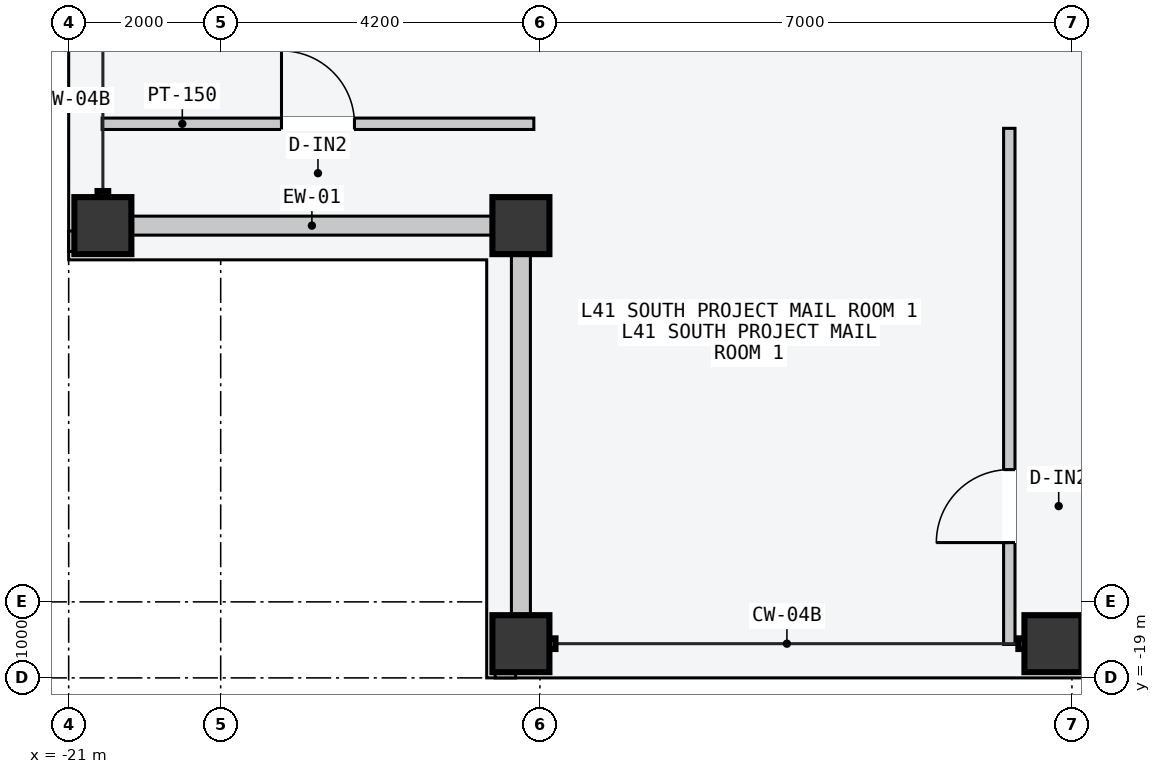
"""IFC4 building model, lengths in metres.
Left out: names, types, materials, properties, quantities, classifications, styles, units other than length and angle.
Written with IfcOpenShell. Run it as: python <this file> out.ifc"""

import sys

from ifc_helpers import new_model, si_unit, direction, frame, frame_2d, origin, origin_2d, place, context, subcontext, project, spatial, rectangle, hollow_rectangle, extrude, element, fill, save


model = new_model("IFC4")
c1 = context("Model", 3, precision=1e-05, world=origin(), true_north=direction((0.0, 1.0)))
c2 = subcontext(c1, "Body", "Model", "MODEL_VIEW")
j1 = project(units=[si_unit("LENGTHUNIT", "METRE"), si_unit("PLANEANGLEUNIT", "RADIAN")], contexts=[c1])
p1 = place(None, origin())
s1 = spatial("IfcSite", under=j1, at=p1, CompositionType="ELEMENT")
p2 = place(p1, origin())
s2 = spatial("IfcBuilding", under=s1, at=p2, CompositionType="ELEMENT")
p3 = place(p2, frame((0.0, 0.0, 158.7)))
s3 = spatial("IfcBuildingStorey", under=s2, at=p3, CompositionType="ELEMENT", Elevation=158.7)
for number, where, z_axis, x_axis in (
    (1, (-15.05, -18.55, 0.0), (0.0, 0.0, 1.0), (1.0, 0.0, 0.0)),
    (2, (-8.05, -18.55, 0.0), (0.0, 0.0, 1.0), (1.0, 0.0, 0.0)),
    (3, (-20.55, -13.05, 0.0), (0.0, 0.0, 1.0), (0.0, 1.0, 0.0)),
    (4, (-15.05, -13.05, 0.0), (0.0, 0.0, 1.0), (1.0, 0.0, 0.0)),
):
    element("IfcColumn", number, at=place(p3, frame(where, z_axis=z_axis, x_axis=x_axis)), inside=s3, PredefinedType="COLUMN", context=c2, shape_type="SweptSolid", body=[
        extrude(hollow_rectangle(XDim=0.75, YDim=0.75, WallThickness=0.032, at=origin_2d()), origin(), (0.0, 0.0, 1.0), 3.6),
    ])
for number, where, z_axis, x_axis in (
    (5, (-20.165, -13.05, 0.0), (0.0, 0.0, 1.0), (1.0, 0.0, 0.0)),
    (6, (-15.05, -18.165, 0.0), (0.0, 0.0, 1.0), (0.0, 1.0, 0.0)),
):
    element("IfcWall", number, at=place(p3, frame(where, z_axis=z_axis, x_axis=x_axis)), inside=s3, PredefinedType="STANDARD", context=c2, shape_type="SweptSolid", body=[
        extrude(rectangle(XDim=4.73, YDim=0.25, at=frame_2d((2.365, 0.0))), origin(), (0.0, 0.0, 1.0), 2.75),
    ])
for number, where, z_axis, x_axis in (
    (7, (-15.39, -18.89, 0.0), (0.0, 0.0, 1.0), (1.0, 0.0, 0.0)),
    (8, (-20.89, -13.39, 0.0), (0.0, 0.0, 1.0), (0.0, 1.0, 0.0)),
):
    element("IfcWall", number, at=place(p3, frame(where, z_axis=z_axis, x_axis=x_axis)), inside=s3, PredefinedType="PARAPET", context=c2, shape_type="SweptSolid", body=[
        extrude(rectangle(XDim=0.27, YDim=0.22, at=frame_2d((0.135, 0.0))), origin(), (0.0, 0.0, 1.0), 1.2),
    ])
p4 = place(p3, frame((-8.624, -18.56, 0.0), z_axis=(0.0, 0.0, 1.0), x_axis=(0.0, 1.0, 0.0)))
e9 = element("IfcWall", 9, at=p4, inside=s3, PredefinedType="PARTITIONING", context=c2, shape_type="SweptSolid", body=[
    extrude(rectangle(XDim=6.79, YDim=0.15, at=frame_2d((3.395, 0.0))), origin(), (0.0, 0.0, 1.0), 3.4),
])
p5 = place(p4, frame((1.34, 0.0, 0.0)))
e10 = element("IfcOpeningElement", 10, at=p5, cuts=e9, PredefinedType="OPENING", context=c2, shape_type="SweptSolid", body=[
    extrude(rectangle(XDim=0.96, YDim=2.18, at=frame_2d((0.48, 1.09))), frame((0.0, 0.085, 0.0), z_axis=(0.0, -1.0, 0.0), x_axis=(1.0, 0.0, 0.0)), (0.0, 0.0, 1.0), 0.17),
])
p6 = place(p3, frame((-20.56, -11.71, 0.0), z_axis=(0.0, 0.0, 1.0), x_axis=(1.0, 0.0, 0.0)))
e11 = element("IfcWall", 11, at=p6, inside=s3, PredefinedType="PARTITIONING", context=c2, shape_type="SweptSolid", body=[
    extrude(rectangle(XDim=5.68, YDim=0.15, at=frame_2d((2.84, 0.0))), origin(), (0.0, 0.0, 1.0), 3.4),
])
p7 = place(p6, frame((2.36, 0.0, 0.0)))
e12 = element("IfcOpeningElement", 12, at=p7, cuts=e11, PredefinedType="OPENING", context=c2, shape_type="SweptSolid", body=[
    extrude(rectangle(XDim=0.96, YDim=2.18, at=frame_2d((0.48, 1.09))), frame((0.0, 0.085, 0.0), z_axis=(0.0, -1.0, 0.0), x_axis=(1.0, 0.0, 0.0)), (0.0, 0.0, 1.0), 0.17),
])
p8 = place(p5, origin())
e13 = element("IfcDoor", 13, at=p8, inside=s3, OperationType="SINGLE_SWING_LEFT", PredefinedType="DOOR", context=c2, shape_type="SweptSolid", body=[
    extrude(rectangle(XDim=0.96, YDim=2.18, at=frame_2d((0.48, 1.09))), frame((0.0, 0.025, 0.0), z_axis=(0.0, -1.0, 0.0), x_axis=(1.0, 0.0, 0.0)), (0.0, 0.0, 1.0), 0.05),
])
fill(e10, e13)
p9 = place(p7, origin())
e14 = element("IfcDoor", 14, at=p9, inside=s3, OperationType="SINGLE_SWING_LEFT", PredefinedType="DOOR", context=c2, shape_type="SweptSolid", body=[
    extrude(rectangle(XDim=0.96, YDim=2.18, at=frame_2d((0.48, 1.09))), frame((0.0, 0.025, 0.0), z_axis=(0.0, -1.0, 0.0), x_axis=(1.0, 0.0, 0.0)), (0.0, 0.0, 1.0), 0.05),
])
fill(e12, e14)
save(model, sys.argv[1])
